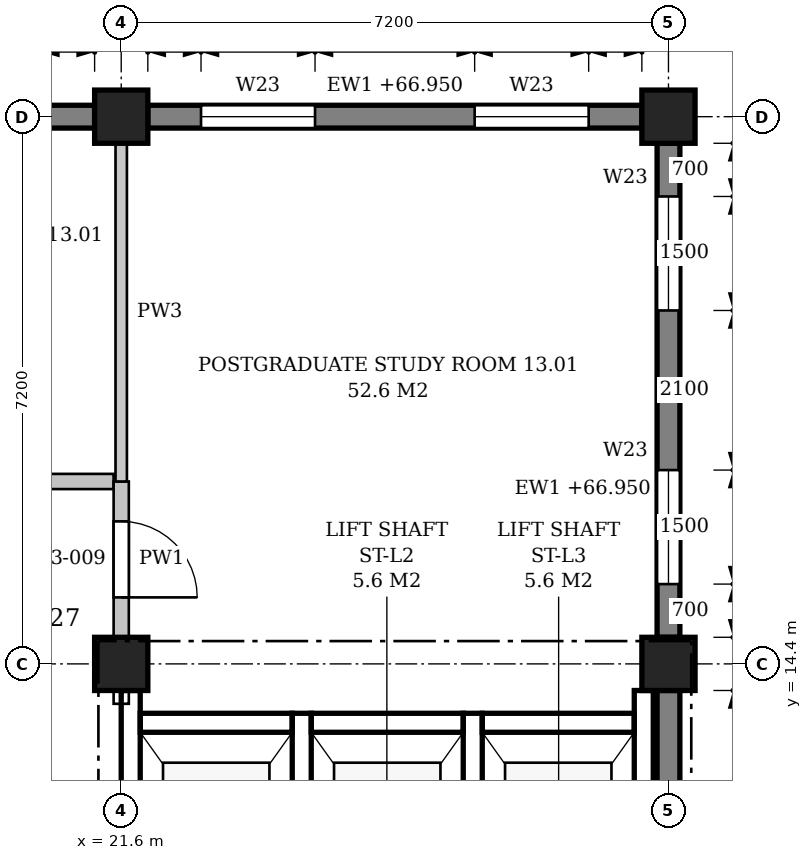
"""IFC4 building model, lengths in metres.
Left out: names, types, materials, properties, quantities, classifications, styles, units other than length and angle.
Written with IfcOpenShell. Run it as: python <this file> out.ifc"""

import sys

from ifc_helpers import new_model, si_unit, direction, frame, frame_2d, origin, origin_2d, place, context, subcontext, project, spatial, polyline, rectangle, outline, extrude, element, fill, save


model = new_model("IFC4")
c1 = context("Model", 3, precision=1e-05, world=origin(), true_north=direction((0.0, 1.0)))
c2 = subcontext(c1, "Body", "Model", "MODEL_VIEW")
j1 = project(units=[si_unit("LENGTHUNIT", "METRE"), si_unit("PLANEANGLEUNIT", "RADIAN")], contexts=[c1])
p1 = place(None, origin())
s1 = spatial("IfcSite", under=j1, at=p1, CompositionType="ELEMENT")
p2 = place(p1, origin())
s2 = spatial("IfcBuilding", under=s1, at=p2, CompositionType="ELEMENT")
p3 = place(p2, frame((0.0, 0.0, 63.3)))
s3 = spatial("IfcBuildingStorey", under=s2, at=p3, CompositionType="ELEMENT", Elevation=63.3)
for number, where, z_axis, x_axis in (
    (1, (21.6, 14.4, 0.0), (0.0, 0.0, 1.0), (1.0, 0.0, 0.0)),
    (2, (21.6, 21.6, 0.0), (0.0, 0.0, 1.0), (1.0, 0.0, 0.0)),
    (3, (28.8, 14.4, 0.0), (0.0, 0.0, 1.0), (1.0, 0.0, 0.0)),
    (4, (28.8, 21.6, 0.0), (0.0, 0.0, 1.0), (1.0, 0.0, 0.0)),
):
    element("IfcColumn", number, at=place(p3, frame(where, z_axis=z_axis, x_axis=x_axis)), inside=s3, PredefinedType="COLUMN", context=c2, shape_type="SweptSolid", body=[
        extrude(rectangle(XDim=0.7, YDim=0.7, at=origin_2d()), origin(), (0.0, 0.0, 1.0), 4.5),
    ])
p4 = place(p3, frame((28.8, 7.55, 0.0), z_axis=(0.0, 0.0, 1.0), x_axis=(0.0, 1.0, 0.0)))
e5 = element("IfcWall", 5, at=p4, inside=s3, PredefinedType="STANDARD", context=c2, shape_type="SweptSolid", body=[
    extrude(rectangle(XDim=6.5, YDim=0.3, at=frame_2d((3.25, 0.0))), origin(), (0.0, 0.0, 1.0), 3.65),
])
p5 = place(p4, frame((0.7, 0.0, 0.9)))
e6 = element("IfcOpeningElement", 6, at=p5, cuts=e5, PredefinedType="OPENING", context=c2, shape_type="SweptSolid", body=[
    extrude(outline(polyline([(0.0, 0.0), (1.5, 0.0), (1.5, 1.95), (0.75, 2.7), (0.0, 1.95), (0.0, 0.0)])), frame((0.0, 0.16, 0.0), z_axis=(0.0, -1.0, 0.0), x_axis=(1.0, 0.0, 0.0)), (0.0, 0.0, 1.0), 0.32),
])
p6 = place(p3, frame((28.8, 14.75, 0.0), z_axis=(0.0, 0.0, 1.0), x_axis=(0.0, 1.0, 0.0)))
e7 = element("IfcWall", 7, at=p6, inside=s3, PredefinedType="STANDARD", context=c2, shape_type="SweptSolid", body=[
    extrude(rectangle(XDim=6.5, YDim=0.3, at=frame_2d((3.25, 0.0))), origin(), (0.0, 0.0, 1.0), 3.65),
])
p7 = place(p6, frame((0.7, 0.0, 0.9)))
e8 = element("IfcOpeningElement", 8, at=p7, cuts=e7, PredefinedType="OPENING", context=c2, shape_type="SweptSolid", body=[
    extrude(outline(polyline([(0.0, 0.0), (1.5, 0.0), (1.5, 1.95), (0.75, 2.7), (0.0, 1.95), (0.0, 0.0)])), frame((0.0, 0.16, 0.0), z_axis=(0.0, -1.0, 0.0), x_axis=(1.0, 0.0, 0.0)), (0.0, 0.0, 1.0), 0.32),
])
p8 = place(p6, frame((4.3, 0.0, 0.9)))
e9 = element("IfcOpeningElement", 9, at=p8, cuts=e7, PredefinedType="OPENING", context=c2, shape_type="SweptSolid", body=[
    extrude(outline(polyline([(0.0, 0.0), (1.5, 0.0), (1.5, 1.95), (0.75, 2.7), (0.0, 1.95), (0.0, 0.0)])), frame((0.0, 0.16, 0.0), z_axis=(0.0, -1.0, 0.0), x_axis=(1.0, 0.0, 0.0)), (0.0, 0.0, 1.0), 0.32),
])
p9 = place(p3, frame((28.45, 21.6, 0.0), z_axis=(0.0, 0.0, 1.0), x_axis=(-1.0, 0.0, 0.0)))
e10 = element("IfcWall", 10, at=p9, inside=s3, PredefinedType="STANDARD", context=c2, shape_type="SweptSolid", body=[
    extrude(rectangle(XDim=6.5, YDim=0.3, at=frame_2d((3.25, 0.0))), origin(), (0.0, 0.0, 1.0), 3.65),
])
p10 = place(p9, frame((0.7, 0.0, 0.9)))
e11 = element("IfcOpeningElement", 11, at=p10, cuts=e10, PredefinedType="OPENING", context=c2, shape_type="SweptSolid", body=[
    extrude(outline(polyline([(0.0, 0.0), (1.5, 0.0), (1.5, 1.95), (0.75, 2.7), (0.0, 1.95), (0.0, 0.0)])), frame((0.0, 0.16, 0.0), z_axis=(0.0, -1.0, 0.0), x_axis=(1.0, 0.0, 0.0)), (0.0, 0.0, 1.0), 0.32),
])
p11 = place(p9, frame((4.3, 0.0, 0.9)))
e12 = element("IfcOpeningElement", 12, at=p11, cuts=e10, PredefinedType="OPENING", context=c2, shape_type="SweptSolid", body=[
    extrude(outline(polyline([(0.0, 0.0), (1.5, 0.0), (1.5, 1.95), (0.75, 2.7), (0.0, 1.95), (0.0, 0.0)])), frame((0.0, 0.16, 0.0), z_axis=(0.0, -1.0, 0.0), x_axis=(1.0, 0.0, 0.0)), (0.0, 0.0, 1.0), 0.32),
])
p12 = place(p3, frame((21.25, 21.6, 0.0), z_axis=(0.0, 0.0, 1.0), x_axis=(-1.0, 0.0, 0.0)))
e13 = element("IfcWall", 13, at=p12, inside=s3, PredefinedType="STANDARD", context=c2, shape_type="SweptSolid", body=[
    extrude(rectangle(XDim=6.5, YDim=0.3, at=frame_2d((3.25, 0.0))), origin(), (0.0, 0.0, 1.0), 3.65),
])
p13 = place(p12, frame((0.7, 0.0, 0.9)))
e14 = element("IfcOpeningElement", 14, at=p13, cuts=e13, PredefinedType="OPENING", context=c2, shape_type="SweptSolid", body=[
    extrude(outline(polyline([(0.0, 0.0), (1.5, 0.0), (1.5, 1.95), (0.75, 2.7), (0.0, 1.95), (0.0, 0.0)])), frame((0.0, 0.16, 0.0), z_axis=(0.0, -1.0, 0.0), x_axis=(1.0, 0.0, 0.0)), (0.0, 0.0, 1.0), 0.32),
])
p14 = place(p12, frame((4.3, 0.0, 0.9)))
e15 = element("IfcOpeningElement", 15, at=p14, cuts=e13, PredefinedType="OPENING", context=c2, shape_type="SweptSolid", body=[
    extrude(outline(polyline([(0.0, 0.0), (1.5, 0.0), (1.5, 1.95), (0.75, 2.7), (0.0, 1.95), (0.0, 0.0)])), frame((0.0, 0.16, 0.0), z_axis=(0.0, -1.0, 0.0), x_axis=(1.0, 0.0, 0.0)), (0.0, 0.0, 1.0), 0.32),
])
p15 = place(p3, frame((21.725, 10.45, -0.25), z_axis=(0.0, 0.0, 1.0), x_axis=(0.0, 1.0, 0.0)))
e16 = element("IfcWall", 16, at=p15, inside=s3, PredefinedType="SHEAR", context=c2, shape_type="SweptSolid", body=[
    extrude(rectangle(XDim=3.6, YDim=0.25, at=frame_2d((1.8, 0.0))), origin(), (0.0, 0.0, 1.0), 3.85),
])
for number, where, z_axis, x_axis in (
    (17, (23.975, 10.45, -0.25), (0.0, 0.0, 1.0), (0.0, 1.0, 0.0)),
    (18, (26.225, 10.45, -0.25), (0.0, 0.0, 1.0), (0.0, 1.0, 0.0)),
):
    element("IfcWall", number, at=place(p3, frame(where, z_axis=z_axis, x_axis=x_axis)), inside=s3, PredefinedType="SHEAR", context=c2, shape_type="SweptSolid", body=[
        extrude(rectangle(XDim=3.3, YDim=0.25, at=frame_2d((1.65, 0.0))), origin(), (0.0, 0.0, 1.0), 4.5),
    ])
p16 = place(p3, frame((28.475, 10.45, -0.25), z_axis=(0.0, 0.0, 1.0), x_axis=(0.0, 1.0, 0.0)))
e19 = element("IfcWall", 19, at=p16, inside=s3, PredefinedType="SHEAR", context=c2, shape_type="SweptSolid", body=[
    extrude(rectangle(XDim=3.6, YDim=0.25, at=frame_2d((1.8, 0.0))), origin(), (0.0, 0.0, 1.0), 4.5),
])
for number, where, z_axis, x_axis in (
    (20, (21.85, 13.625, -0.25), (0.0, 0.0, 1.0), (1.0, 0.0, 0.0)),
    (21, (24.1, 13.625, -0.25), (0.0, 0.0, 1.0), (1.0, 0.0, 0.0)),
    (22, (26.35, 13.625, -0.25), (0.0, 0.0, 1.0), (1.0, 0.0, 0.0)),
):
    element("IfcWall", number, at=place(p3, frame(where, z_axis=z_axis, x_axis=x_axis)), inside=s3, PredefinedType="SHEAR", context=c2, shape_type="SweptSolid", body=[
        extrude(rectangle(XDim=2.0, YDim=0.25, at=frame_2d((1.0, 0.0))), origin(), (0.0, 0.0, 1.0), 4.5),
    ])
p17 = place(p3, frame((18.1, 16.8, 0.0), z_axis=(0.0, 0.0, 1.0), x_axis=(1.0, 0.0, 0.0)))
e23 = element("IfcWall", 23, at=p17, inside=s3, PredefinedType="PARTITIONING", context=c2, shape_type="SweptSolid", body=[
    extrude(outline(polyline([(0.0, 0.0), (3.4, 0.0), (3.4, 3.6), (3.3, 3.6), (3.3, 4.25), (0.0, 4.25), (0.0, 0.0)])), frame((0.0, 0.1, 0.0), z_axis=(0.0, -1.0, 0.0), x_axis=(1.0, 0.0, 0.0)), (0.0, 0.0, 1.0), 0.2),
])
p18 = place(p17, frame((1.2, 0.0, 0.0)))
e24 = element("IfcOpeningElement", 24, at=p18, cuts=e23, PredefinedType="OPENING", context=c2, shape_type="SweptSolid", body=[
    extrude(rectangle(XDim=1.0, YDim=2.1, at=frame_2d((0.5, 1.05))), frame((0.0, 0.11, 0.0), z_axis=(0.0, -1.0, 0.0), x_axis=(1.0, 0.0, 0.0)), (0.0, 0.0, 1.0), 0.22),
])
p19 = place(p3, frame((21.6, 13.875, 0.0), z_axis=(0.0, 0.0, 1.0), x_axis=(0.0, 1.0, 0.0)))
e25 = element("IfcWall", 25, at=p19, inside=s3, PredefinedType="PARTITIONING", context=c2, shape_type="SweptSolid", body=[
    extrude(rectangle(XDim=0.175, YDim=0.2, at=frame_2d((0.087, 0.0))), origin(), (0.0, 0.0, 1.0), 3.6),
])
p20 = place(p3, frame((21.6, 14.75, 0.0), z_axis=(0.0, 0.0, 1.0), x_axis=(0.0, 1.0, 0.0)))
e26 = element("IfcWall", 26, at=p20, inside=s3, PredefinedType="PARTITIONING", context=c2, shape_type="SweptSolid", body=[
    extrude(rectangle(XDim=2.05, YDim=0.2, at=frame_2d((1.025, 0.0))), origin(), (0.0, 0.0, 1.0), 3.6),
])
p21 = place(p20, frame((0.525, 0.0, 0.0)))
e27 = element("IfcOpeningElement", 27, at=p21, cuts=e26, PredefinedType="OPENING", context=c2, shape_type="SweptSolid", body=[
    extrude(rectangle(XDim=1.0, YDim=2.1, at=frame_2d((0.5, 1.05))), frame((0.0, 0.11, 0.0), z_axis=(0.0, -1.0, 0.0), x_axis=(1.0, 0.0, 0.0)), (0.0, 0.0, 1.0), 0.22),
])
p22 = place(p3, frame((21.6, 16.8, 0.0), z_axis=(0.0, 0.0, 1.0), x_axis=(0.0, 1.0, 0.0)))
e28 = element("IfcWall", 28, at=p22, inside=s3, PredefinedType="PARTITIONING", context=c2, shape_type="SweptSolid", body=[
    extrude(rectangle(XDim=4.45, YDim=0.15, at=frame_2d((2.225, 0.0))), origin(), (0.0, 0.0, 1.0), 3.6),
])
p23 = place(p7, origin())
e29 = element("IfcWindow", 29, at=p23, inside=s3, PartitioningType="SINGLE_PANEL", PredefinedType="WINDOW", context=c2, shape_type="SweptSolid", body=[
    extrude(outline(polyline([(0.0, 0.0), (1.5, 0.0), (1.5, 1.95), (0.75, 2.7), (0.0, 1.95), (0.0, 0.0)])), frame((0.0, 0.03, 0.0), z_axis=(0.0, -1.0, 0.0), x_axis=(1.0, 0.0, 0.0)), (0.0, 0.0, 1.0), 0.06),
])
fill(e8, e29)
p24 = place(p8, origin())
e30 = element("IfcWindow", 30, at=p24, inside=s3, PartitioningType="SINGLE_PANEL", PredefinedType="WINDOW", context=c2, shape_type="SweptSolid", body=[
    extrude(outline(polyline([(0.0, 0.0), (1.5, 0.0), (1.5, 1.95), (0.75, 2.7), (0.0, 1.95), (0.0, 0.0)])), frame((0.0, 0.03, 0.0), z_axis=(0.0, -1.0, 0.0), x_axis=(1.0, 0.0, 0.0)), (0.0, 0.0, 1.0), 0.06),
])
fill(e9, e30)
p25 = place(p10, origin())
e31 = element("IfcWindow", 31, at=p25, inside=s3, PartitioningType="SINGLE_PANEL", PredefinedType="WINDOW", context=c2, shape_type="SweptSolid", body=[
    extrude(outline(polyline([(0.0, 0.0), (1.5, 0.0), (1.5, 1.95), (0.75, 2.7), (0.0, 1.95), (0.0, 0.0)])), frame((0.0, 0.03, 0.0), z_axis=(0.0, -1.0, 0.0), x_axis=(1.0, 0.0, 0.0)), (0.0, 0.0, 1.0), 0.06),
])
fill(e11, e31)
p26 = place(p11, origin())
e32 = element("IfcWindow", 32, at=p26, inside=s3, PartitioningType="SINGLE_PANEL", PredefinedType="WINDOW", context=c2, shape_type="SweptSolid", body=[
    extrude(outline(polyline([(0.0, 0.0), (1.5, 0.0), (1.5, 1.95), (0.75, 2.7), (0.0, 1.95), (0.0, 0.0)])), frame((0.0, 0.03, 0.0), z_axis=(0.0, -1.0, 0.0), x_axis=(1.0, 0.0, 0.0)), (0.0, 0.0, 1.0), 0.06),
])
fill(e12, e32)
p27 = place(p21, frame((1.0, 0.0, 0.0), z_axis=(0.0, 0.0, 1.0), x_axis=(-1.0, 0.0, 0.0)))
e33 = element("IfcDoor", 33, at=p27, inside=s3, OperationType="SINGLE_SWING_RIGHT", PredefinedType="DOOR", context=c2, shape_type="SweptSolid", body=[
    extrude(rectangle(XDim=1.0, YDim=2.1, at=frame_2d((0.5, 1.05))), frame((0.0, 0.025, 0.0), z_axis=(0.0, -1.0, 0.0), x_axis=(1.0, 0.0, 0.0)), (0.0, 0.0, 1.0), 0.05),
])
fill(e27, e33)
save(model, sys.argv[1])
